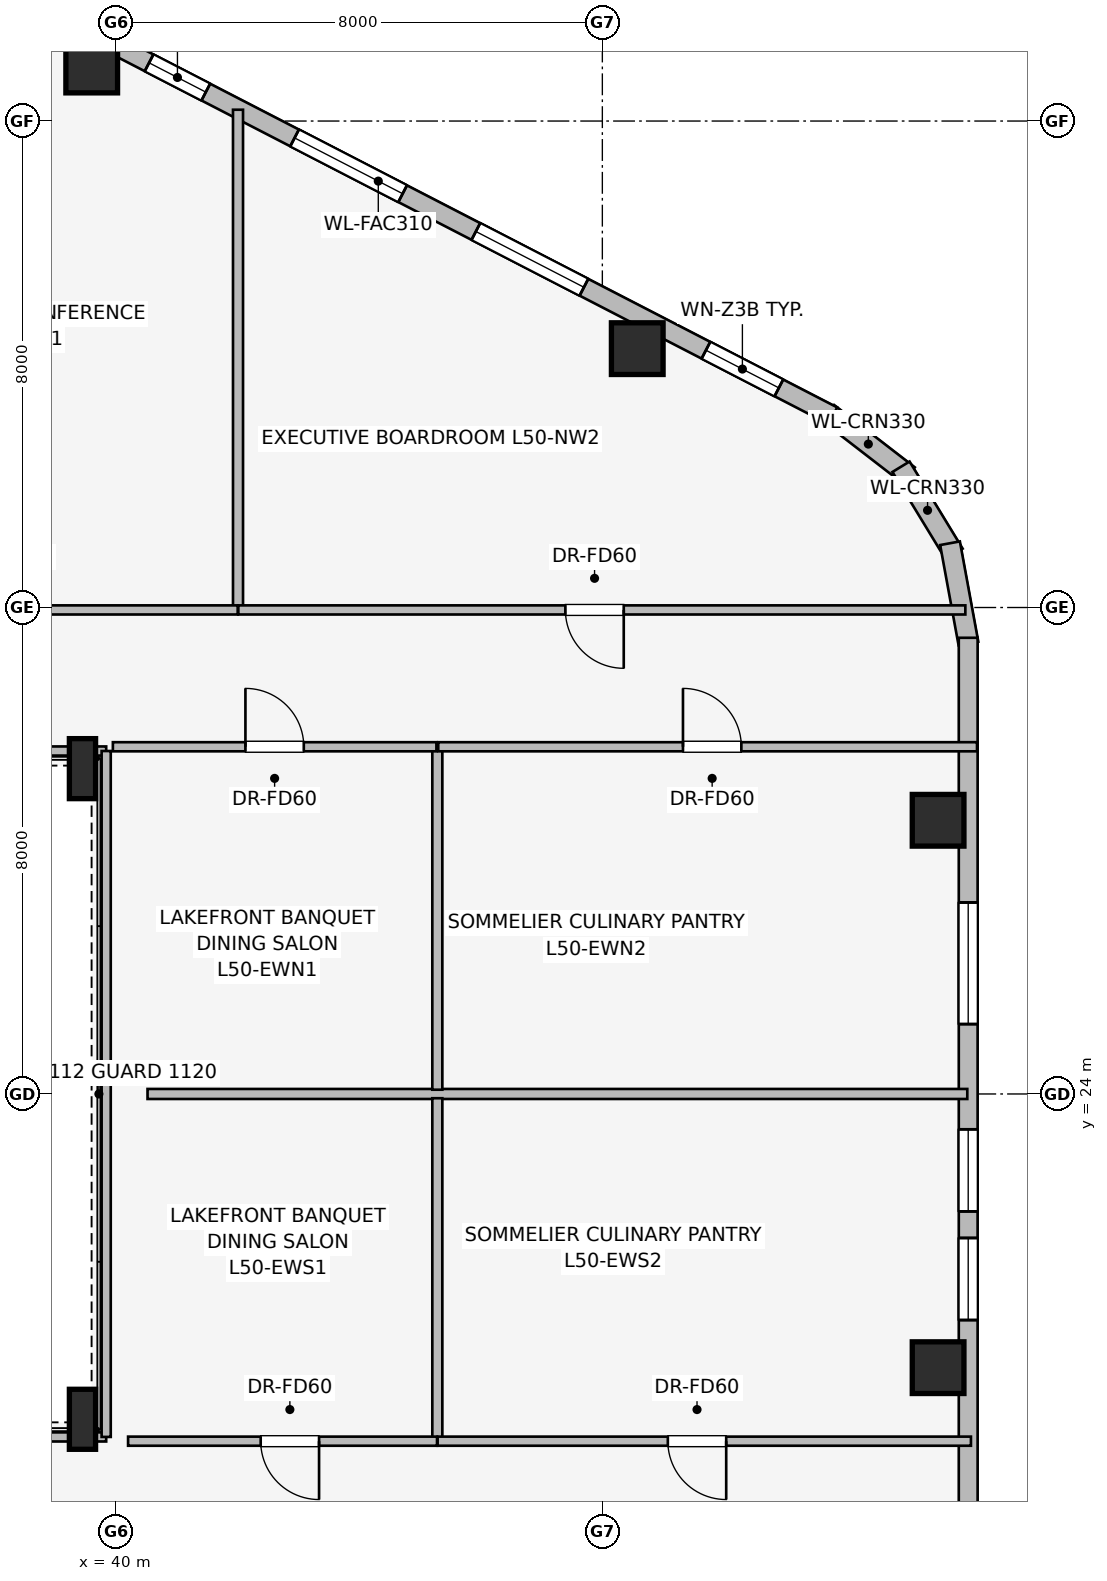
"""IFC4 building model, lengths in metres.
Left out: names, types, materials, properties, quantities, classifications, styles, units other than length and angle.
Written with IfcOpenShell. Run it as: python <this file> out.ifc"""

import sys

from ifc_helpers import new_model, si_unit, direction, frame, frame_2d, origin, origin_2d, place, context, subcontext, project, spatial, rectangle, i_section, extrude, element, fill, save


model = new_model("IFC4")
c1 = context("Model", 3, precision=1e-05, world=origin(), true_north=direction((0.0, 1.0)))
c2 = subcontext(c1, "Body", "Model", "MODEL_VIEW")
j1 = project(units=[si_unit("LENGTHUNIT", "METRE"), si_unit("PLANEANGLEUNIT", "RADIAN")], contexts=[c1])
p1 = place(None, origin())
s1 = spatial("IfcSite", under=j1, at=p1, CompositionType="ELEMENT")
p2 = place(p1, origin())
s2 = spatial("IfcBuilding", under=s1, at=p2, CompositionType="ELEMENT")
p3 = place(p2, frame((0.0, 0.0, 184.35)))
s3 = spatial("IfcBuildingStorey", under=s2, at=p3, CompositionType="ELEMENT", Elevation=184.35)
for number, where, z_axis, x_axis in (
    (1, (48.574, 36.257, 0.0), (0.0, 0.0, 1.0), (1.0, 0.0, 0.0)),
    (2, (39.602, 40.888, 0.0), (0.0, 0.0, 1.0), (1.0, 0.0, 0.0)),
    (3, (53.522, 19.499, 0.0), (0.0, 0.0, 1.0), (1.0, 0.0, 0.0)),
    (4, (53.522, 28.501, 0.0), (0.0, 0.0, 1.0), (1.0, 0.0, 0.0)),
):
    element("IfcColumn", number, at=place(p3, frame(where, z_axis=z_axis, x_axis=x_axis)), inside=s3, PredefinedType="COLUMN", context=c2, shape_type="SweptSolid", body=[
        extrude(rectangle(XDim=0.85, YDim=0.85, at=origin_2d()), origin(), (0.0, 0.0, 1.0), 3.45),
    ])
for number, where, z_axis, x_axis in (
    (5, (39.45, 18.65, 0.0), (0.0, 0.0, 1.0), (1.0, 0.0, 0.0)),
    (6, (39.45, 29.35, 0.0), (0.0, 0.0, 1.0), (1.0, 0.0, 0.0)),
):
    element("IfcColumn", number, at=place(p3, frame(where, z_axis=z_axis, x_axis=x_axis)), inside=s3, PredefinedType="COLUMN", context=c2, shape_type="SweptSolid", body=[
        extrude(i_section(OverallWidth=0.431, OverallDepth=0.987, WebThickness=0.034, FlangeThickness=0.062, at=origin_2d()), origin(), (0.0, 0.0, 1.0), 3.45),
    ])
p4 = place(p3, frame((51.711, 35.2, 0.0), z_axis=(0.0, 0.0, 1.0), x_axis=(0.791464279355, -0.611215423976, 0.0)))
e7 = element("IfcWall", 7, at=p4, inside=s3, PredefinedType="STANDARD", context=c2, shape_type="SweptSolid", body=[
    extrude(rectangle(XDim=1.677, YDim=0.33, at=frame_2d((0.838, 0.0))), origin(), (0.0, 0.0, 1.0), 3.19),
])
p5 = place(p3, frame((52.912, 34.315, 0.0), z_axis=(0.0, 0.0, 1.0), x_axis=(0.520219286058, -0.85403272444, 0.0)))
e8 = element("IfcWall", 8, at=p5, inside=s3, PredefinedType="STANDARD", context=c2, shape_type="SweptSolid", body=[
    extrude(rectangle(XDim=1.678, YDim=0.33, at=frame_2d((0.839, 0.0))), origin(), (0.0, 0.0, 1.0), 3.19),
])
p6 = place(p3, frame((53.718, 33.057, 0.0), z_axis=(0.0, 0.0, 1.0), x_axis=(0.180717642671, -0.983535019014, 0.0)))
e9 = element("IfcWall", 9, at=p6, inside=s3, PredefinedType="STANDARD", context=c2, shape_type="SweptSolid", body=[
    extrude(rectangle(XDim=1.677, YDim=0.33, at=frame_2d((0.838, 0.0))), origin(), (0.0, 0.0, 1.0), 3.19),
])
p7 = place(p3, frame((36.838, 42.871, 0.0), z_axis=(0.0, 0.0, 1.0), x_axis=(0.888626188278, -0.458632202867, 0.0)))
e10 = element("IfcWall", 10, at=p7, inside=s3, PredefinedType="STANDARD", context=c2, shape_type="SweptSolid", body=[
    extrude(rectangle(XDim=16.828, YDim=0.31, at=frame_2d((8.414, 0.0))), origin(), (0.0, 0.0, 1.0), 3.19),
])
p8 = place(p7, frame((0.675, 0.0, 0.75)))
e11 = element("IfcOpeningElement", 11, at=p8, cuts=e10, PredefinedType="OPENING", context=c2, shape_type="SweptSolid", body=[
    extrude(rectangle(XDim=2.0, YDim=1.5, at=frame_2d((1.0, 0.75))), frame((0.0, 0.165, 0.0), z_axis=(0.0, -1.0, 0.0), x_axis=(1.0, 0.0, 0.0)), (0.0, 0.0, 1.0), 0.33),
])
p9 = place(p7, frame((4.172, 0.0, 0.75)))
e12 = element("IfcOpeningElement", 12, at=p9, cuts=e10, PredefinedType="OPENING", context=c2, shape_type="SweptSolid", body=[
    extrude(rectangle(XDim=1.05, YDim=1.4, at=frame_2d((0.525, 0.7))), frame((0.0, 0.165, 0.0), z_axis=(0.0, -1.0, 0.0), x_axis=(1.0, 0.0, 0.0)), (0.0, 0.0, 1.0), 0.33),
])
p10 = place(p7, frame((6.865, 0.0, 0.75)))
e13 = element("IfcOpeningElement", 13, at=p10, cuts=e10, PredefinedType="OPENING", context=c2, shape_type="SweptSolid", body=[
    extrude(rectangle(XDim=2.0, YDim=1.5, at=frame_2d((1.0, 0.75))), frame((0.0, 0.165, 0.0), z_axis=(0.0, -1.0, 0.0), x_axis=(1.0, 0.0, 0.0)), (0.0, 0.0, 1.0), 0.33),
])
p11 = place(p7, frame((10.22, 0.0, 0.75)))
e14 = element("IfcOpeningElement", 14, at=p11, cuts=e10, PredefinedType="OPENING", context=c2, shape_type="SweptSolid", body=[
    extrude(rectangle(XDim=2.0, YDim=1.5, at=frame_2d((1.0, 0.75))), frame((0.0, 0.165, 0.0), z_axis=(0.0, -1.0, 0.0), x_axis=(1.0, 0.0, 0.0)), (0.0, 0.0, 1.0), 0.33),
])
p12 = place(p7, frame((14.478, 0.0, 0.75)))
e15 = element("IfcOpeningElement", 15, at=p12, cuts=e10, PredefinedType="OPENING", context=c2, shape_type="SweptSolid", body=[
    extrude(rectangle(XDim=1.35, YDim=1.45, at=frame_2d((0.675, 0.725))), frame((0.0, 0.165, 0.0), z_axis=(0.0, -1.0, 0.0), x_axis=(1.0, 0.0, 0.0)), (0.0, 0.0, 1.0), 0.33),
])
p13 = place(p3, frame((54.017, 31.502, 0.0), z_axis=(0.0, 0.0, 1.0), x_axis=(0.0, -1.0, 0.0)))
e16 = element("IfcWall", 16, at=p13, inside=s3, PredefinedType="STANDARD", context=c2, shape_type="SweptSolid", body=[
    extrude(rectangle(XDim=15.004, YDim=0.31, at=frame_2d((7.502, 0.0))), origin(), (0.0, 0.0, 1.0), 3.19),
])
p14 = place(p13, frame((4.353, 0.0, 0.75)))
e17 = element("IfcOpeningElement", 17, at=p14, cuts=e16, PredefinedType="OPENING", context=c2, shape_type="SweptSolid", body=[
    extrude(rectangle(XDim=2.0, YDim=1.5, at=frame_2d((1.0, 0.75))), frame((0.0, 0.165, 0.0), z_axis=(0.0, -1.0, 0.0), x_axis=(1.0, 0.0, 0.0)), (0.0, 0.0, 1.0), 0.33),
])
p15 = place(p13, frame((8.083, 0.0, 0.75)))
e18 = element("IfcOpeningElement", 18, at=p15, cuts=e16, PredefinedType="OPENING", context=c2, shape_type="SweptSolid", body=[
    extrude(rectangle(XDim=1.35, YDim=1.45, at=frame_2d((0.675, 0.725))), frame((0.0, 0.165, 0.0), z_axis=(0.0, -1.0, 0.0), x_axis=(1.0, 0.0, 0.0)), (0.0, 0.0, 1.0), 0.33),
])
p16 = place(p13, frame((9.87, 0.0, 0.75)))
e19 = element("IfcOpeningElement", 19, at=p16, cuts=e16, PredefinedType="OPENING", context=c2, shape_type="SweptSolid", body=[
    extrude(rectangle(XDim=1.35, YDim=1.45, at=frame_2d((0.675, 0.725))), frame((0.0, 0.165, 0.0), z_axis=(0.0, -1.0, 0.0), x_axis=(1.0, 0.0, 0.0)), (0.0, 0.0, 1.0), 0.33),
])
p17 = place(p3, frame((27.55, 18.36, 0.0), z_axis=(0.0, 0.0, 1.0), x_axis=(1.0, 0.0, 0.0)))
e20 = element("IfcWall", 20, at=p17, inside=s3, PredefinedType="PARTITIONING", context=c2, shape_type="SweptSolid", body=[
    extrude(rectangle(XDim=12.29, YDim=0.15, at=frame_2d((6.145, 0.0))), origin(), (0.0, 0.0, 1.0), 2.331),
])
p18 = place(p3, frame((39.84, 29.64, 0.0), z_axis=(0.0, 0.0, 1.0), x_axis=(-1.0, 0.0, 0.0)))
e21 = element("IfcWall", 21, at=p18, inside=s3, PredefinedType="PARTITIONING", context=c2, shape_type="SweptSolid", body=[
    extrude(rectangle(XDim=12.2, YDim=0.15, at=frame_2d((6.1, 0.0))), origin(), (0.0, 0.0, 1.0), 2.331),
])
p19 = place(p3, frame((39.84, 18.36, 0.0), z_axis=(0.0, 0.0, 1.0), x_axis=(0.0, 1.0, 0.0)))
e22 = element("IfcWall", 22, at=p19, inside=s3, PredefinedType="PARTITIONING", context=c2, shape_type="SweptSolid", body=[
    extrude(rectangle(XDim=11.28, YDim=0.15, at=frame_2d((5.64, 0.0))), origin(), (0.0, 0.0, 1.0), 3.19),
])
p20 = place(p3, frame((42.008, 31.97, 0.0), z_axis=(0.0, 0.0, 1.0), x_axis=(0.0, 1.0, 0.0)))
e23 = element("IfcWall", 23, at=p20, inside=s3, PredefinedType="PARTITIONING", context=c2, shape_type="SweptSolid", body=[
    extrude(rectangle(XDim=8.216, YDim=0.165, at=frame_2d((4.108, 0.0))), origin(), (0.0, 0.0, 1.0), 3.19),
])
p21 = place(p3, frame((42.003, 31.96, 0.0), z_axis=(0.0, 0.0, 1.0), x_axis=(-1.0, 0.0, 0.0)))
e24 = element("IfcWall", 24, at=p21, inside=s3, PredefinedType="PARTITIONING", context=c2, shape_type="SweptSolid", body=[
    extrude(rectangle(XDim=7.713, YDim=0.15, at=frame_2d((3.856, 0.0))), origin(), (0.0, 0.0, 1.0), 3.19),
])
p22 = place(p21, frame((3.257, 0.0, 0.0)))
e25 = element("IfcOpeningElement", 25, at=p22, cuts=e24, PredefinedType="OPENING", context=c2, shape_type="SweptSolid", body=[
    extrude(rectangle(XDim=0.96, YDim=2.0, at=frame_2d((0.48, 1.0))), frame((0.0, 0.085, 0.0), z_axis=(0.0, -1.0, 0.0), x_axis=(1.0, 0.0, 0.0)), (0.0, 0.0, 1.0), 0.17),
])
p23 = place(p3, frame((53.97, 31.96, 0.0), z_axis=(0.0, 0.0, 1.0), x_axis=(-1.0, 0.0, 0.0)))
e26 = element("IfcWall", 26, at=p23, inside=s3, PredefinedType="PARTITIONING", context=c2, shape_type="SweptSolid", body=[
    extrude(rectangle(XDim=11.957, YDim=0.15, at=frame_2d((5.979, 0.0))), origin(), (0.0, 0.0, 1.0), 3.19),
])
p24 = place(p23, frame((5.618, 0.0, 0.0)))
e27 = element("IfcOpeningElement", 27, at=p24, cuts=e26, PredefinedType="OPENING", context=c2, shape_type="SweptSolid", body=[
    extrude(rectangle(XDim=0.96, YDim=2.0, at=frame_2d((0.48, 1.0))), frame((0.0, 0.085, 0.0), z_axis=(0.0, -1.0, 0.0), x_axis=(1.0, 0.0, 0.0)), (0.0, 0.0, 1.0), 0.17),
])
p25 = place(p3, frame((40.52, 24.0, 0.0), z_axis=(0.0, 0.0, 1.0), x_axis=(1.0, 0.0, 0.0)))
e28 = element("IfcWall", 28, at=p25, inside=s3, PredefinedType="PARTITIONING", context=c2, shape_type="SweptSolid", body=[
    extrude(rectangle(XDim=13.482, YDim=0.165, at=frame_2d((6.741, 0.0))), origin(), (0.0, 0.0, 1.0), 3.19),
])
p26 = place(p3, frame((45.286, 24.07, 0.0), z_axis=(0.0, 0.0, 1.0), x_axis=(0.0, 1.0, 0.0)))
e29 = element("IfcWall", 29, at=p26, inside=s3, PredefinedType="PARTITIONING", context=c2, shape_type="SweptSolid", body=[
    extrude(rectangle(XDim=5.64, YDim=0.165, at=frame_2d((2.82, 0.0))), origin(), (0.0, 0.0, 1.0), 2.733),
])
p27 = place(p3, frame((39.95, 29.71, 0.0), z_axis=(0.0, 0.0, 1.0), x_axis=(1.0, 0.0, 0.0)))
e30 = element("IfcWall", 30, at=p27, inside=s3, PredefinedType="PARTITIONING", context=c2, shape_type="SweptSolid", body=[
    extrude(rectangle(XDim=5.321, YDim=0.15, at=frame_2d((2.661, 0.0))), origin(), (0.0, 0.0, 1.0), 3.19),
])
p28 = place(p27, frame((2.18, 0.0, 0.0)))
e31 = element("IfcOpeningElement", 31, at=p28, cuts=e30, PredefinedType="OPENING", context=c2, shape_type="SweptSolid", body=[
    extrude(rectangle(XDim=0.96, YDim=2.0, at=frame_2d((0.48, 1.0))), frame((0.0, 0.085, 0.0), z_axis=(0.0, -1.0, 0.0), x_axis=(1.0, 0.0, 0.0)), (0.0, 0.0, 1.0), 0.17),
])
p29 = place(p3, frame((45.301, 29.71, 0.0), z_axis=(0.0, 0.0, 1.0), x_axis=(1.0, 0.0, 0.0)))
e32 = element("IfcWall", 32, at=p29, inside=s3, PredefinedType="PARTITIONING", context=c2, shape_type="SweptSolid", body=[
    extrude(rectangle(XDim=8.861, YDim=0.15, at=frame_2d((4.431, 0.0))), origin(), (0.0, 0.0, 1.0), 3.19),
])
p30 = place(p29, frame((4.025, 0.0, 0.0)))
e33 = element("IfcOpeningElement", 33, at=p30, cuts=e32, PredefinedType="OPENING", context=c2, shape_type="SweptSolid", body=[
    extrude(rectangle(XDim=0.96, YDim=2.0, at=frame_2d((0.48, 1.0))), frame((0.0, 0.085, 0.0), z_axis=(0.0, -1.0, 0.0), x_axis=(1.0, 0.0, 0.0)), (0.0, 0.0, 1.0), 0.17),
])
p31 = place(p3, frame((45.286, 18.29, 0.0), z_axis=(0.0, 0.0, 1.0), x_axis=(0.0, 1.0, 0.0)))
e34 = element("IfcWall", 34, at=p31, inside=s3, PredefinedType="PARTITIONING", context=c2, shape_type="SweptSolid", body=[
    extrude(rectangle(XDim=5.64, YDim=0.165, at=frame_2d((2.82, 0.0))), origin(), (0.0, 0.0, 1.0), 2.733),
])
p32 = place(p3, frame((45.281, 18.29, 0.0), z_axis=(0.0, 0.0, 1.0), x_axis=(-1.0, 0.0, 0.0)))
e35 = element("IfcWall", 35, at=p32, inside=s3, PredefinedType="PARTITIONING", context=c2, shape_type="SweptSolid", body=[
    extrude(rectangle(XDim=5.081, YDim=0.15, at=frame_2d((2.541, 0.0))), origin(), (0.0, 0.0, 1.0), 3.19),
])
p33 = place(p32, frame((1.94, 0.0, 0.0)))
e36 = element("IfcOpeningElement", 36, at=p33, cuts=e35, PredefinedType="OPENING", context=c2, shape_type="SweptSolid", body=[
    extrude(rectangle(XDim=0.96, YDim=2.0, at=frame_2d((0.48, 1.0))), frame((0.0, 0.085, 0.0), z_axis=(0.0, -1.0, 0.0), x_axis=(1.0, 0.0, 0.0)), (0.0, 0.0, 1.0), 0.17),
])
p34 = place(p3, frame((54.062, 18.29, 0.0), z_axis=(0.0, 0.0, 1.0), x_axis=(-1.0, 0.0, 0.0)))
e37 = element("IfcWall", 37, at=p34, inside=s3, PredefinedType="PARTITIONING", context=c2, shape_type="SweptSolid", body=[
    extrude(rectangle(XDim=8.771, YDim=0.15, at=frame_2d((4.385, 0.0))), origin(), (0.0, 0.0, 1.0), 3.19),
])
p35 = place(p34, frame((4.025, 0.0, 0.0)))
e38 = element("IfcOpeningElement", 38, at=p35, cuts=e37, PredefinedType="OPENING", context=c2, shape_type="SweptSolid", body=[
    extrude(rectangle(XDim=0.96, YDim=2.0, at=frame_2d((0.48, 1.0))), frame((0.0, 0.085, 0.0), z_axis=(0.0, -1.0, 0.0), x_axis=(1.0, 0.0, 0.0)), (0.0, 0.0, 1.0), 0.17),
])
p36 = place(p9, origin())
e39 = element("IfcWindow", 39, at=p36, inside=s3, PartitioningType="SINGLE_PANEL", PredefinedType="WINDOW", context=c2, shape_type="SweptSolid", body=[
    extrude(rectangle(XDim=1.05, YDim=1.4, at=frame_2d((0.525, 0.7))), frame((0.0, 0.03, 0.0), z_axis=(0.0, -1.0, 0.0), x_axis=(1.0, 0.0, 0.0)), (0.0, 0.0, 1.0), 0.06),
])
fill(e12, e39)
p37 = place(p10, origin())
e40 = element("IfcWindow", 40, at=p37, inside=s3, PartitioningType="SINGLE_PANEL", PredefinedType="WINDOW", context=c2, shape_type="SweptSolid", body=[
    extrude(rectangle(XDim=2.0, YDim=1.5, at=frame_2d((1.0, 0.75))), frame((0.0, 0.03, 0.0), z_axis=(0.0, -1.0, 0.0), x_axis=(1.0, 0.0, 0.0)), (0.0, 0.0, 1.0), 0.06),
])
fill(e13, e40)
p38 = place(p11, origin())
e41 = element("IfcWindow", 41, at=p38, inside=s3, PartitioningType="SINGLE_PANEL", PredefinedType="WINDOW", context=c2, shape_type="SweptSolid", body=[
    extrude(rectangle(XDim=2.0, YDim=1.5, at=frame_2d((1.0, 0.75))), frame((0.0, 0.03, 0.0), z_axis=(0.0, -1.0, 0.0), x_axis=(1.0, 0.0, 0.0)), (0.0, 0.0, 1.0), 0.06),
])
fill(e14, e41)
p39 = place(p12, origin())
e42 = element("IfcWindow", 42, at=p39, inside=s3, PartitioningType="SINGLE_PANEL", PredefinedType="WINDOW", context=c2, shape_type="SweptSolid", body=[
    extrude(rectangle(XDim=1.35, YDim=1.45, at=frame_2d((0.675, 0.725))), frame((0.0, 0.03, 0.0), z_axis=(0.0, -1.0, 0.0), x_axis=(1.0, 0.0, 0.0)), (0.0, 0.0, 1.0), 0.06),
])
fill(e15, e42)
p40 = place(p14, origin())
e43 = element("IfcWindow", 43, at=p40, inside=s3, PartitioningType="SINGLE_PANEL", PredefinedType="WINDOW", context=c2, shape_type="SweptSolid", body=[
    extrude(rectangle(XDim=2.0, YDim=1.5, at=frame_2d((1.0, 0.75))), frame((0.0, 0.03, 0.0), z_axis=(0.0, -1.0, 0.0), x_axis=(1.0, 0.0, 0.0)), (0.0, 0.0, 1.0), 0.06),
])
fill(e17, e43)
p41 = place(p15, origin())
e44 = element("IfcWindow", 44, at=p41, inside=s3, PartitioningType="SINGLE_PANEL", PredefinedType="WINDOW", context=c2, shape_type="SweptSolid", body=[
    extrude(rectangle(XDim=1.35, YDim=1.45, at=frame_2d((0.675, 0.725))), frame((0.0, 0.03, 0.0), z_axis=(0.0, -1.0, 0.0), x_axis=(1.0, 0.0, 0.0)), (0.0, 0.0, 1.0), 0.06),
])
fill(e18, e44)
p42 = place(p16, origin())
e45 = element("IfcWindow", 45, at=p42, inside=s3, PartitioningType="SINGLE_PANEL", PredefinedType="WINDOW", context=c2, shape_type="SweptSolid", body=[
    extrude(rectangle(XDim=1.35, YDim=1.45, at=frame_2d((0.675, 0.725))), frame((0.0, 0.03, 0.0), z_axis=(0.0, -1.0, 0.0), x_axis=(1.0, 0.0, 0.0)), (0.0, 0.0, 1.0), 0.06),
])
fill(e19, e45)
p43 = place(p24, origin())
e46 = element("IfcDoor", 46, at=p43, inside=s3, OperationType="SINGLE_SWING_LEFT", PredefinedType="DOOR", context=c2, shape_type="SweptSolid", body=[
    extrude(rectangle(XDim=0.96, YDim=2.0, at=frame_2d((0.48, 1.0))), frame((0.0, 0.025, 0.0), z_axis=(0.0, -1.0, 0.0), x_axis=(1.0, 0.0, 0.0)), (0.0, 0.0, 1.0), 0.05),
])
fill(e27, e46)
p44 = place(p28, origin())
e47 = element("IfcDoor", 47, at=p44, inside=s3, OperationType="SINGLE_SWING_LEFT", PredefinedType="DOOR", context=c2, shape_type="SweptSolid", body=[
    extrude(rectangle(XDim=0.96, YDim=2.0, at=frame_2d((0.48, 1.0))), frame((0.0, 0.025, 0.0), z_axis=(0.0, -1.0, 0.0), x_axis=(1.0, 0.0, 0.0)), (0.0, 0.0, 1.0), 0.05),
])
fill(e31, e47)
p45 = place(p30, origin())
e48 = element("IfcDoor", 48, at=p45, inside=s3, OperationType="SINGLE_SWING_LEFT", PredefinedType="DOOR", context=c2, shape_type="SweptSolid", body=[
    extrude(rectangle(XDim=0.96, YDim=2.0, at=frame_2d((0.48, 1.0))), frame((0.0, 0.025, 0.0), z_axis=(0.0, -1.0, 0.0), x_axis=(1.0, 0.0, 0.0)), (0.0, 0.0, 1.0), 0.05),
])
fill(e33, e48)
p46 = place(p33, origin())
e49 = element("IfcDoor", 49, at=p46, inside=s3, OperationType="SINGLE_SWING_LEFT", PredefinedType="DOOR", context=c2, shape_type="SweptSolid", body=[
    extrude(rectangle(XDim=0.96, YDim=2.0, at=frame_2d((0.48, 1.0))), frame((0.0, 0.025, 0.0), z_axis=(0.0, -1.0, 0.0), x_axis=(1.0, 0.0, 0.0)), (0.0, 0.0, 1.0), 0.05),
])
fill(e36, e49)
p47 = place(p35, origin())
e50 = element("IfcDoor", 50, at=p47, inside=s3, OperationType="SINGLE_SWING_LEFT", PredefinedType="DOOR", context=c2, shape_type="SweptSolid", body=[
    extrude(rectangle(XDim=0.96, YDim=2.0, at=frame_2d((0.48, 1.0))), frame((0.0, 0.025, 0.0), z_axis=(0.0, -1.0, 0.0), x_axis=(1.0, 0.0, 0.0)), (0.0, 0.0, 1.0), 0.05),
])
fill(e38, e50)
save(model, sys.argv[1])
